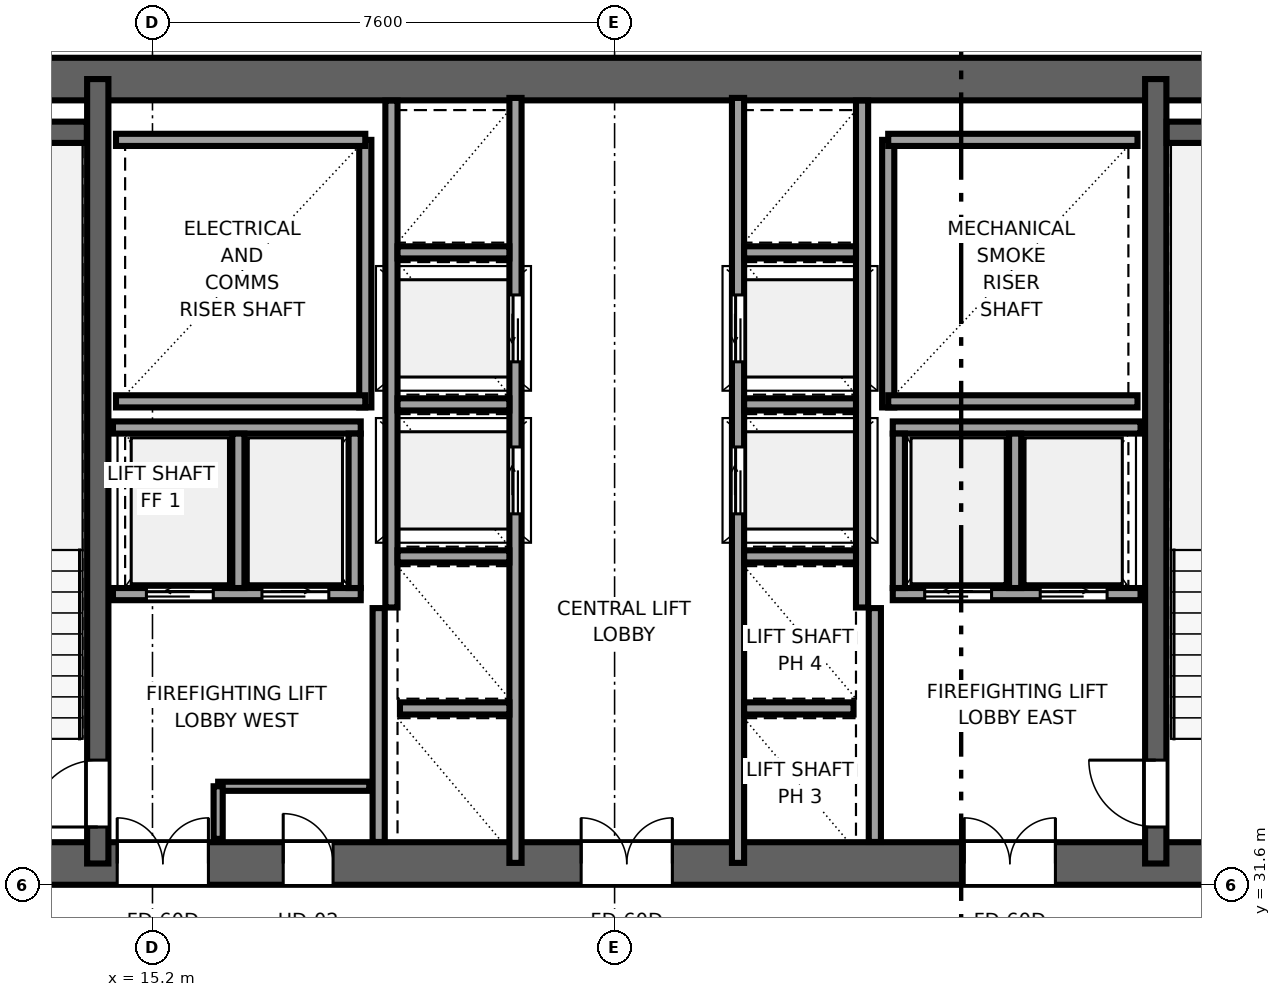
"""IFC4 building model, lengths in metres.
Left out: names, types, materials, properties, quantities, classifications, styles, units other than length and angle.
Written with IfcOpenShell. Run it as: python <this file> out.ifc"""

import sys

from ifc_helpers import new_model, si_unit, direction, frame, frame_2d, origin, place, context, subcontext, project, spatial, rectangle, extrude, source, transform, mapped, element, fill, save


model = new_model("IFC4")
c1 = context("Model", 3, precision=1e-05, world=origin(), true_north=direction((0.0, 1.0)))
c2 = subcontext(c1, "Body", "Model", "MODEL_VIEW")
j1 = project(units=[si_unit("LENGTHUNIT", "METRE"), si_unit("PLANEANGLEUNIT", "RADIAN")], contexts=[c1])
p1 = place(None, origin())
s1 = spatial("IfcSite", under=j1, at=p1, CompositionType="ELEMENT")
p2 = place(p1, origin())
s2 = spatial("IfcBuilding", under=s1, at=p2, CompositionType="ELEMENT")
p3 = place(p2, frame((0.0, 0.0, 154.15)))
s3 = spatial("IfcBuildingStorey", under=s2, at=p3, CompositionType="ELEMENT", Elevation=154.15)
p4 = place(p3, frame((9.8, 31.95, 0.0), z_axis=(0.0, 0.0, 1.0), x_axis=(1.0, 0.0, 0.0)))
e1 = element("IfcWall", 1, at=p4, inside=s3, PredefinedType="SHEAR", context=c2, shape_type="SweptSolid", body=[
    extrude(rectangle(XDim=26.4, YDim=0.7, at=frame_2d((13.2, 0.0))), origin(), (0.0, 0.0, 1.0), 3.55),
])
p5 = place(p4, frame((6.32, 0.0, 0.0), z_axis=(0.0, 0.0, 1.0), x_axis=(-1.0, 0.0, 0.0)))
e2 = element("IfcOpeningElement", 2, at=p5, cuts=e1, PredefinedType="OPENING", context=c2, shape_type="SweptSolid", body=[
    extrude(rectangle(XDim=1.5, YDim=2.04, at=frame_2d((0.75, 1.02))), frame((0.0, 0.36, 0.0), z_axis=(0.0, -1.0, 0.0), x_axis=(1.0, 0.0, 0.0)), (0.0, 0.0, 1.0), 0.72),
])
p6 = place(p4, frame((13.95, 0.0, 0.0), z_axis=(0.0, 0.0, 1.0), x_axis=(-1.0, 0.0, 0.0)))
e3 = element("IfcOpeningElement", 3, at=p6, cuts=e1, PredefinedType="OPENING", context=c2, shape_type="SweptSolid", body=[
    extrude(rectangle(XDim=1.5, YDim=2.04, at=frame_2d((0.75, 1.02))), frame((0.0, 0.36, 0.0), z_axis=(0.0, -1.0, 0.0), x_axis=(1.0, 0.0, 0.0)), (0.0, 0.0, 1.0), 0.72),
])
p7 = place(p4, frame((20.25, 0.0, 0.0), z_axis=(0.0, 0.0, 1.0), x_axis=(-1.0, 0.0, 0.0)))
e4 = element("IfcOpeningElement", 4, at=p7, cuts=e1, PredefinedType="OPENING", context=c2, shape_type="SweptSolid", body=[
    extrude(rectangle(XDim=1.5, YDim=2.04, at=frame_2d((0.75, 1.02))), frame((0.0, 0.36, 0.0), z_axis=(0.0, -1.0, 0.0), x_axis=(1.0, 0.0, 0.0)), (0.0, 0.0, 1.0), 0.72),
])
p8 = place(p4, frame((8.37, 0.0, 0.0), z_axis=(0.0, 0.0, 1.0), x_axis=(-1.0, 0.0, 0.0)))
e5 = element("IfcOpeningElement", 5, at=p8, cuts=e1, PredefinedType="OPENING", context=c2, shape_type="SweptSolid", body=[
    extrude(rectangle(XDim=0.82, YDim=2.01, at=frame_2d((0.41, 1.005))), frame((0.0, 0.36, 0.0), z_axis=(0.0, -1.0, 0.0), x_axis=(1.0, 0.0, 0.0)), (0.0, 0.0, 1.0), 0.72),
])
p9 = place(p3, frame((9.8, 44.85, 0.0), z_axis=(0.0, 0.0, 1.0), x_axis=(1.0, 0.0, 0.0)))
e6 = element("IfcWall", 6, at=p9, inside=s3, PredefinedType="SHEAR", context=c2, shape_type="SweptSolid", body=[
    extrude(rectangle(XDim=26.4, YDim=0.7, at=frame_2d((13.2, 0.0))), origin(), (0.0, 0.0, 1.0), 3.55),
])
p10 = place(p3, frame((14.3, 31.95, 0.0), z_axis=(0.0, 0.0, 1.0), x_axis=(0.0, 1.0, 0.0)))
e7 = element("IfcWall", 7, at=p10, inside=s3, PredefinedType="SHEAR", context=c2, shape_type="SweptSolid", body=[
    extrude(rectangle(XDim=12.9, YDim=0.35, at=frame_2d((6.45, 0.0))), origin(), (0.0, 0.0, 1.0), 3.55),
])
p11 = place(p10, frame((0.6, 0.0, 0.0)))
e8 = element("IfcOpeningElement", 8, at=p11, cuts=e7, PredefinedType="OPENING", context=c2, shape_type="SweptSolid", body=[
    extrude(rectangle(XDim=1.1, YDim=2.12, at=frame_2d((0.55, 1.06))), frame((0.0, 0.185, 0.0), z_axis=(0.0, -1.0, 0.0), x_axis=(1.0, 0.0, 0.0)), (0.0, 0.0, 1.0), 0.37),
])
p12 = place(p3, frame((31.7, 31.95, 0.0), z_axis=(0.0, 0.0, 1.0), x_axis=(0.0, 1.0, 0.0)))
e9 = element("IfcWall", 9, at=p12, inside=s3, PredefinedType="SHEAR", context=c2, shape_type="SweptSolid", body=[
    extrude(rectangle(XDim=12.9, YDim=0.35, at=frame_2d((6.45, 0.0))), origin(), (0.0, 0.0, 1.0), 3.55),
])
p13 = place(p12, frame((1.7, 0.0, 0.0), z_axis=(0.0, 0.0, 1.0), x_axis=(-1.0, 0.0, 0.0)))
e10 = element("IfcOpeningElement", 10, at=p13, cuts=e9, PredefinedType="OPENING", context=c2, shape_type="SweptSolid", body=[
    extrude(rectangle(XDim=1.1, YDim=2.12, at=frame_2d((0.55, 1.06))), frame((0.0, 0.185, 0.0), z_axis=(0.0, -1.0, 0.0), x_axis=(1.0, 0.0, 0.0)), (0.0, 0.0, 1.0), 0.37),
])
for number, where, z_axis, x_axis in (
    (11, (10.52, 43.975, 0.0), (0.0, 0.0, 1.0), (1.0, 0.0, 0.0)),
    (12, (31.88, 43.975, 0.0), (0.0, 0.0, 1.0), (1.0, 0.0, 0.0)),
):
    element("IfcWall", number, at=place(p3, frame(where, z_axis=z_axis, x_axis=x_axis)), inside=s3, PredefinedType="SHEAR", context=c2, shape_type="SweptSolid", body=[
        extrude(rectangle(XDim=3.6, YDim=0.35, at=frame_2d((1.8, 0.0))), origin(), (0.0, 0.0, 1.0), 3.55),
    ])
p14 = place(p3, frame((18.7, 39.45, 0.0), z_axis=(0.0, 0.0, 1.0), x_axis=(0.0, 1.0, 0.0)))
e13 = element("IfcWall", 13, at=p14, inside=s3, PredefinedType="SOLIDWALL", context=c2, shape_type="SweptSolid", body=[
    extrude(rectangle(XDim=4.4, YDim=0.2, at=frame_2d((2.2, 0.0))), origin(), (0.0, 0.0, 1.0), 3.37),
])
for number, where, z_axis, x_axis in (
    (14, (14.6, 39.55, 0.0), (0.0, 0.0, 1.0), (1.0, 0.0, 0.0)),
    (15, (14.6, 43.85, 0.0), (0.0, 0.0, 1.0), (1.0, 0.0, 0.0)),
):
    element("IfcWall", number, at=place(p3, frame(where, z_axis=z_axis, x_axis=x_axis)), inside=s3, PredefinedType="SOLIDWALL", context=c2, shape_type="SweptSolid", body=[
        extrude(rectangle(XDim=4.1, YDim=0.2, at=frame_2d((2.05, 0.0))), origin(), (0.0, 0.0, 1.0), 3.37),
    ])
p15 = place(p3, frame((27.3, 39.45, 0.0), z_axis=(0.0, 0.0, 1.0), x_axis=(0.0, 1.0, 0.0)))
e16 = element("IfcWall", 16, at=p15, inside=s3, PredefinedType="SOLIDWALL", context=c2, shape_type="SweptSolid", body=[
    extrude(rectangle(XDim=4.4, YDim=0.2, at=frame_2d((2.2, 0.0))), origin(), (0.0, 0.0, 1.0), 3.37),
])
for number, where, z_axis, x_axis in (
    (17, (27.3, 39.55, 0.0), (0.0, 0.0, 1.0), (1.0, 0.0, 0.0)),
    (18, (27.3, 43.85, 0.0), (0.0, 0.0, 1.0), (1.0, 0.0, 0.0)),
):
    element("IfcWall", number, at=place(p3, frame(where, z_axis=z_axis, x_axis=x_axis)), inside=s3, PredefinedType="SOLIDWALL", context=c2, shape_type="SweptSolid", body=[
        extrude(rectangle(XDim=4.1, YDim=0.2, at=frame_2d((2.05, 0.0))), origin(), (0.0, 0.0, 1.0), 3.37),
    ])
for number, where, z_axis, x_axis in (
    (19, (18.92, 32.304, 0.0), (0.0, 0.0, 1.0), (0.0, 1.0, 0.0)),
    (20, (27.08, 32.304, 0.0), (0.0, 0.0, 1.0), (0.0, 1.0, 0.0)),
):
    element("IfcWall", number, at=place(p3, frame(where, z_axis=z_axis, x_axis=x_axis)), inside=s3, PredefinedType="SOLIDWALL", context=c2, shape_type="SweptSolid", body=[
        extrude(rectangle(XDim=3.846, YDim=0.2, at=frame_2d((1.923, 0.0))), origin(), (0.0, 0.0, 1.0), 3.37),
    ])
p16 = place(p3, frame((21.17, 31.96, 0.0), z_axis=(0.0, 0.0, 1.0), x_axis=(0.0, 1.0, 0.0)))
e21 = element("IfcWall", 21, at=p16, inside=s3, PredefinedType="SOLIDWALL", context=c2, shape_type="SweptSolid", body=[
    extrude(rectangle(XDim=12.58, YDim=0.2, at=frame_2d((6.29, 0.0))), origin(), (0.0, 0.0, 1.0), 3.37),
])
p17 = place(p16, frame((5.74, 0.0, 0.0)))
e22 = element("IfcOpeningElement", 22, at=p17, cuts=e21, PredefinedType="OPENING", context=c2, shape_type="SweptSolid", body=[
    extrude(rectangle(XDim=1.1, YDim=2.12, at=frame_2d((0.55, 1.06))), frame((0.0, 0.11, 0.0), z_axis=(0.0, -1.0, 0.0), x_axis=(1.0, 0.0, 0.0)), (0.0, 0.0, 1.0), 0.22),
])
p18 = place(p16, frame((8.24, 0.0, 0.0)))
e23 = element("IfcOpeningElement", 23, at=p18, cuts=e21, PredefinedType="OPENING", context=c2, shape_type="SweptSolid", body=[
    extrude(rectangle(XDim=1.1, YDim=2.12, at=frame_2d((0.55, 1.06))), frame((0.0, 0.11, 0.0), z_axis=(0.0, -1.0, 0.0), x_axis=(1.0, 0.0, 0.0)), (0.0, 0.0, 1.0), 0.22),
])
p19 = place(p3, frame((19.13, 36.16, 0.0), z_axis=(0.0, 0.0, 1.0), x_axis=(0.0, 1.0, 0.0)))
e24 = element("IfcWall", 24, at=p19, inside=s3, PredefinedType="SOLIDWALL", context=c2, shape_type="SweptSolid", body=[
    extrude(rectangle(XDim=8.336, YDim=0.2, at=frame_2d((4.168, 0.0))), origin(), (0.0, 0.0, 1.0), 3.37),
])
p20 = place(p3, frame((19.27, 34.5, 0.0), z_axis=(0.0, 0.0, 1.0), x_axis=(1.0, 0.0, 0.0)))
e25 = element("IfcWall", 25, at=p20, inside=s3, PredefinedType="SOLIDWALL", context=c2, shape_type="SweptSolid", body=[
    extrude(rectangle(XDim=1.8, YDim=0.2, at=frame_2d((0.9, 0.0))), origin(), (0.0, 0.0, 1.0), 3.37),
])
for number, where, z_axis, x_axis in (
    (26, (19.23, 37.0, 0.0), (0.0, 0.0, 1.0), (1.0, 0.0, 0.0)),
    (27, (19.23, 39.5, 0.0), (0.0, 0.0, 1.0), (1.0, 0.0, 0.0)),
    (28, (19.23, 42.0, 0.0), (0.0, 0.0, 1.0), (1.0, 0.0, 0.0)),
):
    element("IfcWall", number, at=place(p3, frame(where, z_axis=z_axis, x_axis=x_axis)), inside=s3, PredefinedType="SOLIDWALL", context=c2, shape_type="SweptSolid", body=[
        extrude(rectangle(XDim=1.84, YDim=0.2, at=frame_2d((0.92, 0.0))), origin(), (0.0, 0.0, 1.0), 3.37),
    ])
p21 = place(p3, frame((27.375, 36.38, 0.0), z_axis=(0.0, 0.0, 1.0), x_axis=(1.0, 0.0, 0.0)))
e29 = element("IfcWall", 29, at=p21, inside=s3, PredefinedType="SOLIDWALL", context=c2, shape_type="SweptSolid", body=[
    extrude(rectangle(XDim=4.075, YDim=0.2, at=frame_2d((2.038, 0.0))), origin(), (0.0, 0.0, 1.0), 3.37),
])
p22 = place(p21, frame((0.525, 0.0, 0.0)))
e30 = element("IfcOpeningElement", 30, at=p22, cuts=e29, PredefinedType="OPENING", context=c2, shape_type="SweptSolid", body=[
    extrude(rectangle(XDim=1.1, YDim=2.12, at=frame_2d((0.55, 1.06))), frame((0.0, 0.11, 0.0), z_axis=(0.0, -1.0, 0.0), x_axis=(1.0, 0.0, 0.0)), (0.0, 0.0, 1.0), 0.22),
])
p23 = place(p21, frame((2.425, 0.0, 0.0)))
e31 = element("IfcOpeningElement", 31, at=p23, cuts=e29, PredefinedType="OPENING", context=c2, shape_type="SweptSolid", body=[
    extrude(rectangle(XDim=1.1, YDim=2.12, at=frame_2d((0.55, 1.06))), frame((0.0, 0.11, 0.0), z_axis=(0.0, -1.0, 0.0), x_axis=(1.0, 0.0, 0.0)), (0.0, 0.0, 1.0), 0.22),
])
p24 = place(p3, frame((27.375, 39.12, 0.0), z_axis=(0.0, 0.0, 1.0), x_axis=(1.0, 0.0, 0.0)))
e32 = element("IfcWall", 32, at=p24, inside=s3, PredefinedType="SOLIDWALL", context=c2, shape_type="SweptSolid", body=[
    extrude(rectangle(XDim=4.075, YDim=0.2, at=frame_2d((2.038, 0.0))), origin(), (0.0, 0.0, 1.0), 3.37),
])
for number, where, z_axis, x_axis in (
    (33, (27.475, 36.48, 0.0), (0.0, 0.0, 1.0), (0.0, 1.0, 0.0)),
    (34, (29.387, 36.48, 0.0), (0.0, 0.0, 1.0), (0.0, 1.0, 0.0)),
):
    element("IfcWall", number, at=place(p3, frame(where, z_axis=z_axis, x_axis=x_axis)), inside=s3, PredefinedType="SOLIDWALL", context=c2, shape_type="SweptSolid", body=[
        extrude(rectangle(XDim=2.54, YDim=0.2, at=frame_2d((1.27, 0.0))), origin(), (0.0, 0.0, 1.0), 3.37),
    ])
p25 = place(p3, frame((14.55, 36.38, 0.0), z_axis=(0.0, 0.0, 1.0), x_axis=(1.0, 0.0, 0.0)))
e35 = element("IfcWall", 35, at=p25, inside=s3, PredefinedType="SOLIDWALL", context=c2, shape_type="SweptSolid", body=[
    extrude(rectangle(XDim=4.075, YDim=0.2, at=frame_2d((2.038, 0.0))), origin(), (0.0, 0.0, 1.0), 3.37),
])
p26 = place(p25, frame((0.55, 0.0, 0.0)))
e36 = element("IfcOpeningElement", 36, at=p26, cuts=e35, PredefinedType="OPENING", context=c2, shape_type="SweptSolid", body=[
    extrude(rectangle(XDim=1.1, YDim=2.12, at=frame_2d((0.55, 1.06))), frame((0.0, 0.11, 0.0), z_axis=(0.0, -1.0, 0.0), x_axis=(1.0, 0.0, 0.0)), (0.0, 0.0, 1.0), 0.22),
])
p27 = place(p25, frame((2.45, 0.0, 0.0)))
e37 = element("IfcOpeningElement", 37, at=p27, cuts=e35, PredefinedType="OPENING", context=c2, shape_type="SweptSolid", body=[
    extrude(rectangle(XDim=1.1, YDim=2.12, at=frame_2d((0.55, 1.06))), frame((0.0, 0.11, 0.0), z_axis=(0.0, -1.0, 0.0), x_axis=(1.0, 0.0, 0.0)), (0.0, 0.0, 1.0), 0.22),
])
p28 = place(p3, frame((14.55, 39.12, 0.0), z_axis=(0.0, 0.0, 1.0), x_axis=(1.0, 0.0, 0.0)))
e38 = element("IfcWall", 38, at=p28, inside=s3, PredefinedType="SOLIDWALL", context=c2, shape_type="SweptSolid", body=[
    extrude(rectangle(XDim=4.075, YDim=0.2, at=frame_2d((2.038, 0.0))), origin(), (0.0, 0.0, 1.0), 3.37),
])
for number, where, z_axis, x_axis in (
    (39, (18.525, 36.48, 0.0), (0.0, 0.0, 1.0), (0.0, 1.0, 0.0)),
    (40, (16.613, 36.48, 0.0), (0.0, 0.0, 1.0), (0.0, 1.0, 0.0)),
):
    element("IfcWall", number, at=place(p3, frame(where, z_axis=z_axis, x_axis=x_axis)), inside=s3, PredefinedType="SOLIDWALL", context=c2, shape_type="SweptSolid", body=[
        extrude(rectangle(XDim=2.54, YDim=0.2, at=frame_2d((1.27, 0.0))), origin(), (0.0, 0.0, 1.0), 3.37),
    ])
p29 = place(p3, frame((24.83, 31.96, 0.0), z_axis=(0.0, 0.0, 1.0), x_axis=(0.0, 1.0, 0.0)))
e41 = element("IfcWall", 41, at=p29, inside=s3, PredefinedType="SOLIDWALL", context=c2, shape_type="SweptSolid", body=[
    extrude(rectangle(XDim=12.58, YDim=0.2, at=frame_2d((6.29, 0.0))), origin(), (0.0, 0.0, 1.0), 3.37),
])
p30 = place(p29, frame((5.74, 0.0, 0.0)))
e42 = element("IfcOpeningElement", 42, at=p30, cuts=e41, PredefinedType="OPENING", context=c2, shape_type="SweptSolid", body=[
    extrude(rectangle(XDim=1.1, YDim=2.12, at=frame_2d((0.55, 1.06))), frame((0.0, 0.11, 0.0), z_axis=(0.0, -1.0, 0.0), x_axis=(1.0, 0.0, 0.0)), (0.0, 0.0, 1.0), 0.22),
])
p31 = place(p29, frame((8.24, 0.0, 0.0)))
e43 = element("IfcOpeningElement", 43, at=p31, cuts=e41, PredefinedType="OPENING", context=c2, shape_type="SweptSolid", body=[
    extrude(rectangle(XDim=1.1, YDim=2.12, at=frame_2d((0.55, 1.06))), frame((0.0, 0.11, 0.0), z_axis=(0.0, -1.0, 0.0), x_axis=(1.0, 0.0, 0.0)), (0.0, 0.0, 1.0), 0.22),
])
p32 = place(p3, frame((26.87, 36.16, 0.0), z_axis=(0.0, 0.0, 1.0), x_axis=(0.0, 1.0, 0.0)))
e44 = element("IfcWall", 44, at=p32, inside=s3, PredefinedType="SOLIDWALL", context=c2, shape_type="SweptSolid", body=[
    extrude(rectangle(XDim=8.336, YDim=0.2, at=frame_2d((4.168, 0.0))), origin(), (0.0, 0.0, 1.0), 3.37),
])
p33 = place(p3, frame((24.93, 34.5, 0.0), z_axis=(0.0, 0.0, 1.0), x_axis=(1.0, 0.0, 0.0)))
e45 = element("IfcWall", 45, at=p33, inside=s3, PredefinedType="SOLIDWALL", context=c2, shape_type="SweptSolid", body=[
    extrude(rectangle(XDim=1.8, YDim=0.2, at=frame_2d((0.9, 0.0))), origin(), (0.0, 0.0, 1.0), 3.37),
])
for number, where, z_axis, x_axis in (
    (46, (24.93, 37.0, 0.0), (0.0, 0.0, 1.0), (1.0, 0.0, 0.0)),
    (47, (24.93, 39.5, 0.0), (0.0, 0.0, 1.0), (1.0, 0.0, 0.0)),
    (48, (24.93, 42.0, 0.0), (0.0, 0.0, 1.0), (1.0, 0.0, 0.0)),
):
    element("IfcWall", number, at=place(p3, frame(where, z_axis=z_axis, x_axis=x_axis)), inside=s3, PredefinedType="SOLIDWALL", context=c2, shape_type="SweptSolid", body=[
        extrude(rectangle(XDim=1.84, YDim=0.2, at=frame_2d((0.92, 0.0))), origin(), (0.0, 0.0, 1.0), 3.37),
    ])
p34 = place(p3, frame((16.28, 33.22, 0.0), z_axis=(0.0, 0.0, 1.0), x_axis=(1.0, 0.0, 0.0)))
e49 = element("IfcWall", 49, at=p34, inside=s3, PredefinedType="PARTITIONING", context=c2, shape_type="SweptSolid", body=[
    extrude(rectangle(XDim=2.485, YDim=0.15, at=frame_2d((1.242, 0.0))), origin(), (0.0, 0.0, 1.0), 3.37),
])
p35 = place(p3, frame((16.28, 32.355, 0.0), z_axis=(0.0, 0.0, 1.0), x_axis=(0.0, 1.0, 0.0)))
e50 = element("IfcWall", 50, at=p35, inside=s3, PredefinedType="PARTITIONING", context=c2, shape_type="SweptSolid", body=[
    extrude(rectangle(XDim=0.865, YDim=0.15, at=frame_2d((0.433, 0.0))), origin(), (0.0, 0.0, 1.0), 3.37),
])
m1 = source(origin(), c2, "Body", "SweptSolid", [
    extrude(rectangle(XDim=1.1, YDim=2.12, at=frame_2d((0.55, 1.06))), frame((0.0, 0.025, 0.0), z_axis=(0.0, -1.0, 0.0), x_axis=(1.0, 0.0, 0.0)), (0.0, 0.0, 1.0), 0.05),
])
p36 = place(p11, origin())
e51 = element("IfcDoor", 51, at=p36, inside=s3, OperationType="SINGLE_SWING_LEFT", PredefinedType="DOOR", context=c2, shape_type="MappedRepresentation", body=[
    mapped(m1, transform((0.0, 0.0, 0.0), x_axis=(1.0, 0.0, 0.0), y_axis=(0.0, 1.0, 0.0), z_axis=(0.0, 0.0, 1.0), scale=1.0)),
])
fill(e8, e51)
p37 = place(p13, origin())
e52 = element("IfcDoor", 52, at=p37, inside=s3, OperationType="SINGLE_SWING_RIGHT", PredefinedType="DOOR", context=c2, shape_type="MappedRepresentation", body=[
    mapped(m1, transform((0.0, 0.0, 0.0), x_axis=(1.0, 0.0, 0.0), y_axis=(0.0, 1.0, 0.0), z_axis=(0.0, 0.0, 1.0), scale=1.0)),
])
fill(e10, e52)
m2 = source(origin(), c2, "Body", "SweptSolid", [
    extrude(rectangle(XDim=1.5, YDim=2.04, at=frame_2d((0.75, 1.02))), frame((0.0, 0.025, 0.0), z_axis=(0.0, -1.0, 0.0), x_axis=(1.0, 0.0, 0.0)), (0.0, 0.0, 1.0), 0.05),
])
p38 = place(p5, origin())
e53 = element("IfcDoor", 53, at=p38, inside=s3, OperationType="DOUBLE_DOOR_SINGLE_SWING", PredefinedType="DOOR", context=c2, shape_type="MappedRepresentation", body=[
    mapped(m2, transform((0.0, 0.0, 0.0), x_axis=(1.0, 0.0, 0.0), y_axis=(0.0, 1.0, 0.0), z_axis=(0.0, 0.0, 1.0), scale=1.0)),
])
fill(e2, e53)
p39 = place(p6, origin())
e54 = element("IfcDoor", 54, at=p39, inside=s3, OperationType="DOUBLE_DOOR_SINGLE_SWING", PredefinedType="DOOR", context=c2, shape_type="MappedRepresentation", body=[
    mapped(m2, transform((0.0, 0.0, 0.0), x_axis=(1.0, 0.0, 0.0), y_axis=(0.0, 1.0, 0.0), z_axis=(0.0, 0.0, 1.0), scale=1.0)),
])
fill(e3, e54)
p40 = place(p7, origin())
e55 = element("IfcDoor", 55, at=p40, inside=s3, OperationType="DOUBLE_DOOR_SINGLE_SWING", PredefinedType="DOOR", context=c2, shape_type="MappedRepresentation", body=[
    mapped(m2, transform((0.0, 0.0, 0.0), x_axis=(1.0, 0.0, 0.0), y_axis=(0.0, 1.0, 0.0), z_axis=(0.0, 0.0, 1.0), scale=1.0)),
])
fill(e4, e55)
m3 = source(origin(), c2, "Body", "SweptSolid", [
    extrude(rectangle(XDim=0.82, YDim=2.01, at=frame_2d((0.41, 1.005))), frame((0.0, 0.025, 0.0), z_axis=(0.0, -1.0, 0.0), x_axis=(1.0, 0.0, 0.0)), (0.0, 0.0, 1.0), 0.05),
])
p41 = place(p8, origin())
e56 = element("IfcDoor", 56, at=p41, inside=s3, OperationType="SINGLE_SWING_LEFT", PredefinedType="DOOR", context=c2, shape_type="MappedRepresentation", body=[
    mapped(m3, transform((0.0, 0.0, 0.0), x_axis=(1.0, 0.0, 0.0), y_axis=(0.0, 1.0, 0.0), z_axis=(0.0, 0.0, 1.0), scale=1.0)),
])
fill(e5, e56)
m4 = source(origin(), c2, "Body", "SweptSolid", [
    extrude(rectangle(XDim=1.1, YDim=2.12, at=frame_2d((0.55, 1.06))), frame((0.0, 0.025, 0.0), z_axis=(0.0, -1.0, 0.0), x_axis=(1.0, 0.0, 0.0)), (0.0, 0.0, 1.0), 0.05),
])
p42 = place(p17, origin())
e57 = element("IfcDoor", 57, at=p42, inside=s3, OperationType="SLIDING_TO_RIGHT", PredefinedType="DOOR", context=c2, shape_type="MappedRepresentation", body=[
    mapped(m4, transform((0.0, 0.0, 0.0), x_axis=(1.0, 0.0, 0.0), y_axis=(0.0, 1.0, 0.0), z_axis=(0.0, 0.0, 1.0), scale=1.0)),
])
fill(e22, e57)
p43 = place(p18, origin())
e58 = element("IfcDoor", 58, at=p43, inside=s3, OperationType="SLIDING_TO_LEFT", PredefinedType="DOOR", context=c2, shape_type="MappedRepresentation", body=[
    mapped(m4, transform((0.0, 0.0, 0.0), x_axis=(1.0, 0.0, 0.0), y_axis=(0.0, 1.0, 0.0), z_axis=(0.0, 0.0, 1.0), scale=1.0)),
])
fill(e23, e58)
p44 = place(p22, origin())
e59 = element("IfcDoor", 59, at=p44, inside=s3, OperationType="SLIDING_TO_LEFT", PredefinedType="DOOR", context=c2, shape_type="MappedRepresentation", body=[
    mapped(m4, transform((0.0, 0.0, 0.0), x_axis=(1.0, 0.0, 0.0), y_axis=(0.0, 1.0, 0.0), z_axis=(0.0, 0.0, 1.0), scale=1.0)),
])
fill(e30, e59)
p45 = place(p23, origin())
e60 = element("IfcDoor", 60, at=p45, inside=s3, OperationType="SLIDING_TO_RIGHT", PredefinedType="DOOR", context=c2, shape_type="MappedRepresentation", body=[
    mapped(m4, transform((0.0, 0.0, 0.0), x_axis=(1.0, 0.0, 0.0), y_axis=(0.0, 1.0, 0.0), z_axis=(0.0, 0.0, 1.0), scale=1.0)),
])
fill(e31, e60)
p46 = place(p26, origin())
e61 = element("IfcDoor", 61, at=p46, inside=s3, OperationType="SLIDING_TO_LEFT", PredefinedType="DOOR", context=c2, shape_type="MappedRepresentation", body=[
    mapped(m4, transform((0.0, 0.0, 0.0), x_axis=(1.0, 0.0, 0.0), y_axis=(0.0, 1.0, 0.0), z_axis=(0.0, 0.0, 1.0), scale=1.0)),
])
fill(e36, e61)
p47 = place(p27, origin())
e62 = element("IfcDoor", 62, at=p47, inside=s3, OperationType="SLIDING_TO_RIGHT", PredefinedType="DOOR", context=c2, shape_type="MappedRepresentation", body=[
    mapped(m4, transform((0.0, 0.0, 0.0), x_axis=(1.0, 0.0, 0.0), y_axis=(0.0, 1.0, 0.0), z_axis=(0.0, 0.0, 1.0), scale=1.0)),
])
fill(e37, e62)
p48 = place(p30, origin())
e63 = element("IfcDoor", 63, at=p48, inside=s3, OperationType="SLIDING_TO_RIGHT", PredefinedType="DOOR", context=c2, shape_type="MappedRepresentation", body=[
    mapped(m4, transform((0.0, 0.0, 0.0), x_axis=(1.0, 0.0, 0.0), y_axis=(0.0, 1.0, 0.0), z_axis=(0.0, 0.0, 1.0), scale=1.0)),
])
fill(e42, e63)
p49 = place(p31, origin())
e64 = element("IfcDoor", 64, at=p49, inside=s3, OperationType="SLIDING_TO_LEFT", PredefinedType="DOOR", context=c2, shape_type="MappedRepresentation", body=[
    mapped(m4, transform((0.0, 0.0, 0.0), x_axis=(1.0, 0.0, 0.0), y_axis=(0.0, 1.0, 0.0), z_axis=(0.0, 0.0, 1.0), scale=1.0)),
])
fill(e43, e64)
save(model, sys.argv[1])
